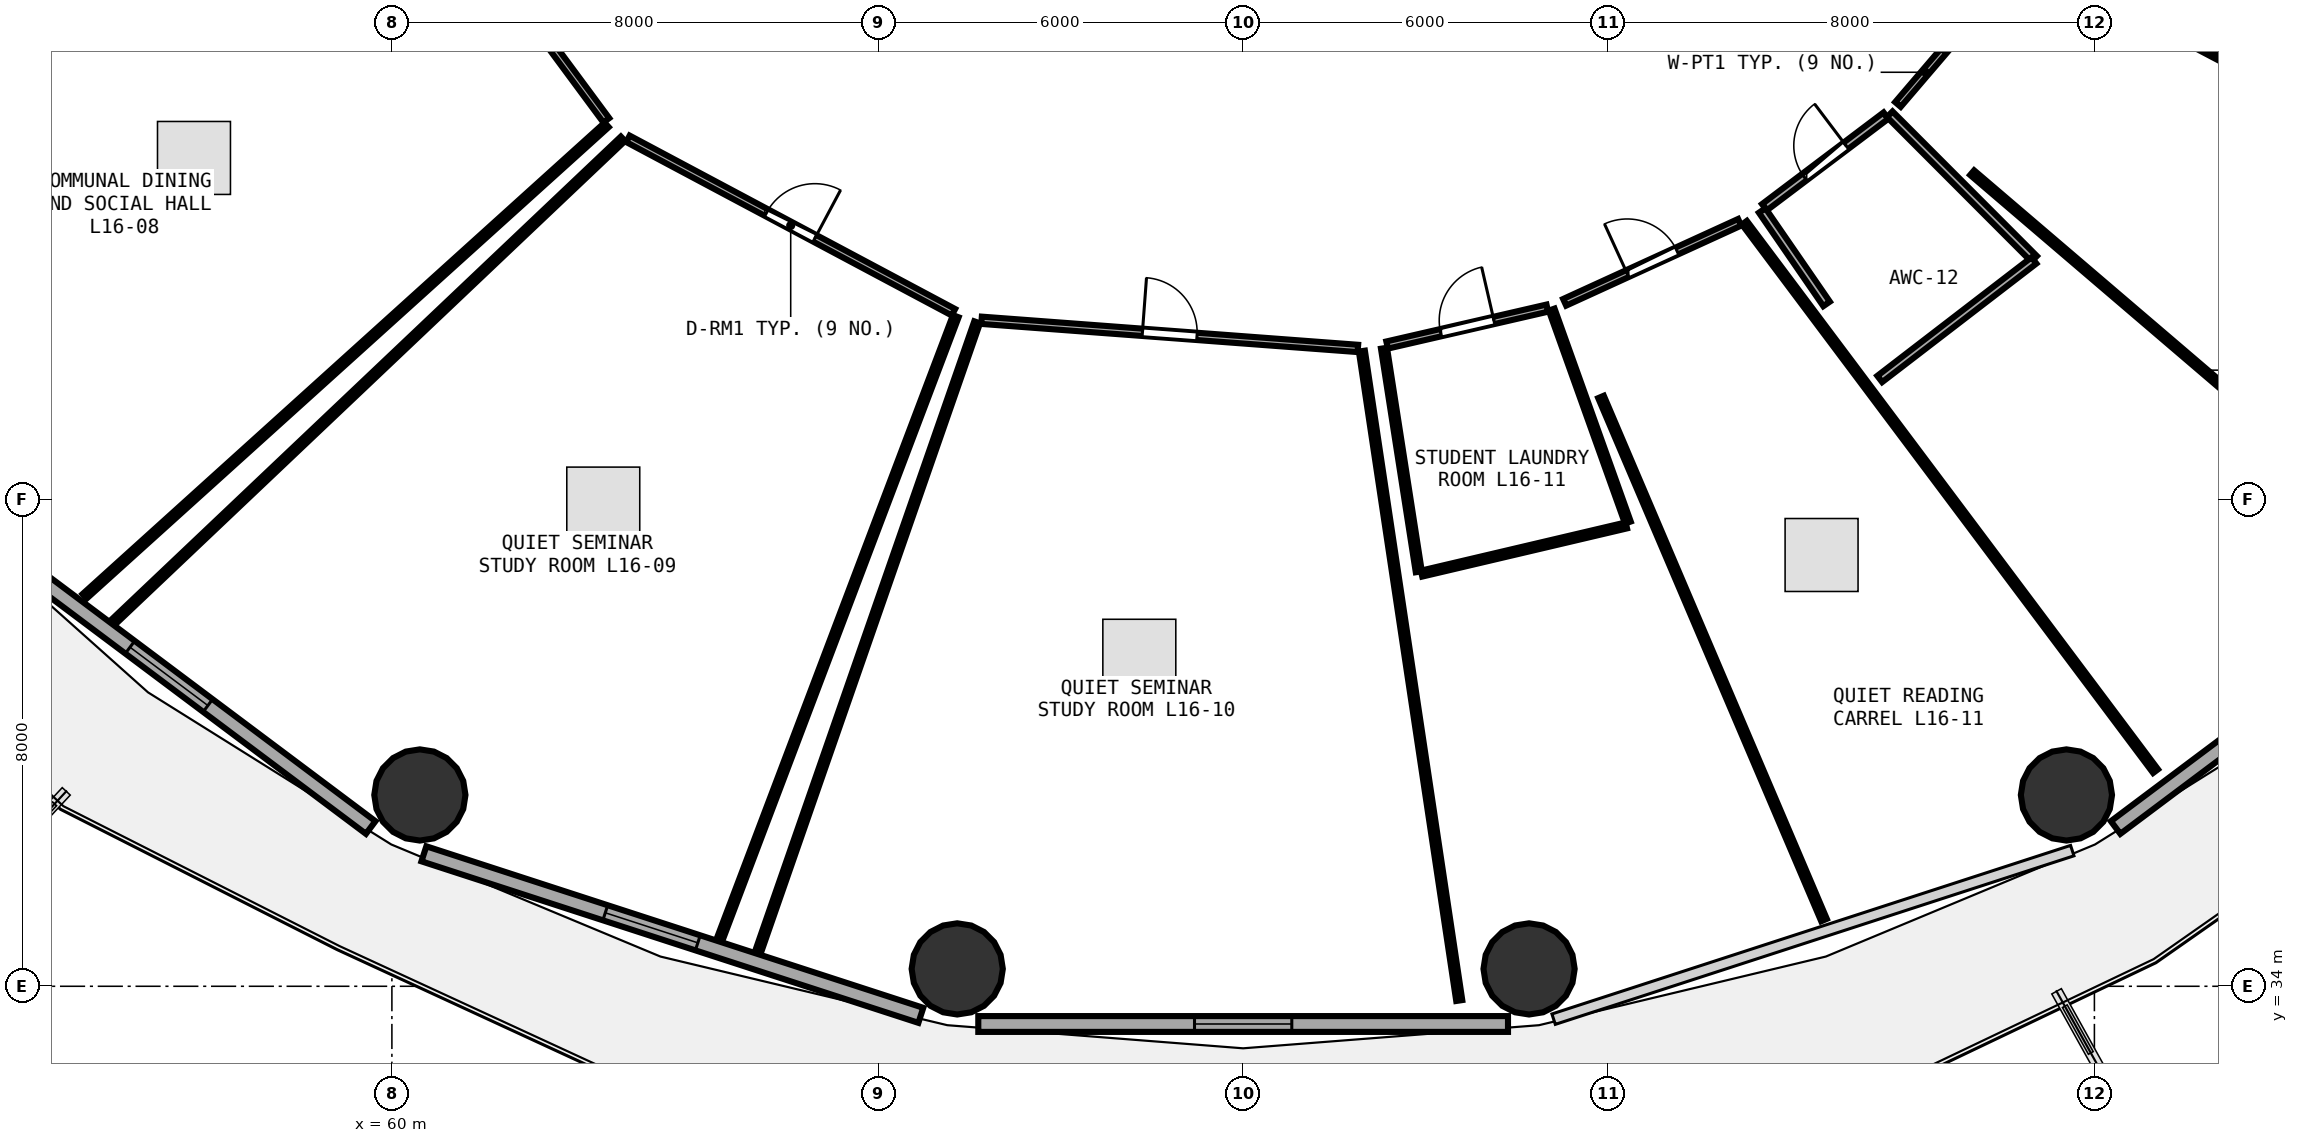
"""IFC4 building model, lengths in metres.
Left out: names, types, materials, properties, quantities, classifications, styles, units other than length and angle.
Written with IfcOpenShell. Run it as: python <this file> out.ifc"""

import sys

from ifc_helpers import new_model, si_unit, direction, frame, frame_2d, origin, origin_2d, place, context, subcontext, project, spatial, rectangle, circle, extrude, element, fill, save


model = new_model("IFC4")
c1 = context("Model", 3, precision=1e-05, world=origin(), true_north=direction((0.0, 1.0)))
c2 = subcontext(c1, "Body", "Model", "MODEL_VIEW")
j1 = project(units=[si_unit("LENGTHUNIT", "METRE"), si_unit("PLANEANGLEUNIT", "RADIAN")], contexts=[c1])
p1 = place(None, origin())
s1 = spatial("IfcSite", under=j1, at=p1, CompositionType="ELEMENT")
p2 = place(p1, origin())
s2 = spatial("IfcBuilding", under=s1, at=p2, CompositionType="ELEMENT")
p3 = place(p2, frame((0.0, 0.0, 63.75)))
s3 = spatial("IfcBuildingStorey", under=s2, at=p3, CompositionType="ELEMENT", Elevation=63.75)
for number, where, z_axis, x_axis in (
    (1, (60.46, 37.146, 0.0), (0.0, 0.0, 1.0), (1.0, 0.0, 0.0)),
    (2, (69.298, 34.286, 0.0), (0.0, 0.0, 1.0), (1.0, 0.0, 0.0)),
    (3, (78.702, 34.286, 0.0), (0.0, 0.0, 1.0), (1.0, 0.0, 0.0)),
    (4, (87.54, 37.146, 0.0), (0.0, 0.0, 1.0), (1.0, 0.0, 0.0)),
):
    element("IfcColumn", number, at=place(p3, frame(where, z_axis=z_axis, x_axis=x_axis)), inside=s3, PredefinedType="COLUMN", context=c2, shape_type="SweptSolid", body=[
        extrude(circle(Radius=0.75, at=origin_2d()), origin(), (0.0, 0.0, 1.0), 3.75),
    ])
p4 = place(p3, frame((53.016, 41.582, 0.0), z_axis=(0.0, 0.0, 1.0), x_axis=(0.80030733173, -0.599590005569, 0.0)))
e5 = element("IfcWall", 5, at=p4, inside=s3, PredefinedType="SOLIDWALL", context=c2, shape_type="SweptSolid", body=[
    extrude(rectangle(XDim=8.291, YDim=0.26, at=frame_2d((4.145, 0.0))), origin(), (0.0, 0.0, 1.0), 3.475),
])
p5 = place(p4, frame((3.345, 0.0, 0.85)))
e6 = element("IfcOpeningElement", 6, at=p5, cuts=e5, PredefinedType="OPENING", context=c2, shape_type="SweptSolid", body=[
    extrude(rectangle(XDim=1.6, YDim=1.45, at=frame_2d((0.8, 0.725))), frame((0.0, 0.14, 0.0), z_axis=(0.0, -1.0, 0.0), x_axis=(1.0, 0.0, 0.0)), (0.0, 0.0, 1.0), 0.28),
])
p6 = place(p3, frame((60.526, 36.178, 0.0), z_axis=(0.0, 0.0, 1.0), x_axis=(0.951039914291, -0.309068085421, 0.0)))
e7 = element("IfcWall", 7, at=p6, inside=s3, PredefinedType="SOLIDWALL", context=c2, shape_type="SweptSolid", body=[
    extrude(rectangle(XDim=8.594, YDim=0.26, at=frame_2d((4.297, 0.0))), origin(), (0.0, 0.0, 1.0), 3.475),
])
p7 = place(p6, frame((3.137, 0.0, 0.85)))
e8 = element("IfcOpeningElement", 8, at=p7, cuts=e7, PredefinedType="OPENING", context=c2, shape_type="SweptSolid", body=[
    extrude(rectangle(XDim=1.6, YDim=1.45, at=frame_2d((0.8, 0.725))), frame((0.0, 0.14, 0.0), z_axis=(0.0, -1.0, 0.0), x_axis=(1.0, 0.0, 0.0)), (0.0, 0.0, 1.0), 0.28),
])
p8 = place(p3, frame((69.644, 33.38, 0.0), z_axis=(0.0, 0.0, 1.0), x_axis=(1.0, 0.0, 0.0)))
e9 = element("IfcWall", 9, at=p8, inside=s3, PredefinedType="SOLIDWALL", context=c2, shape_type="SweptSolid", body=[
    extrude(rectangle(XDim=8.712, YDim=0.26, at=frame_2d((4.356, 0.0))), origin(), (0.0, 0.0, 1.0), 3.475),
])
p9 = place(p8, frame((3.556, 0.0, 0.85)))
e10 = element("IfcOpeningElement", 10, at=p9, cuts=e9, PredefinedType="OPENING", context=c2, shape_type="SweptSolid", body=[
    extrude(rectangle(XDim=1.6, YDim=1.45, at=frame_2d((0.8, 0.725))), frame((0.0, 0.14, 0.0), z_axis=(0.0, -1.0, 0.0), x_axis=(1.0, 0.0, 0.0)), (0.0, 0.0, 1.0), 0.28),
])
p10 = place(p3, frame((88.349, 36.611, 0.0), z_axis=(0.0, 0.0, 1.0), x_axis=(0.80030733173, 0.599590005569, 0.0)))
e11 = element("IfcWall", 11, at=p10, inside=s3, PredefinedType="SOLIDWALL", context=c2, shape_type="SweptSolid", body=[
    extrude(rectangle(XDim=8.291, YDim=0.26, at=frame_2d((4.145, 0.0))), origin(), (0.0, 0.0, 1.0), 3.475),
])
p11 = place(p10, frame((3.345, 0.0, 0.85)))
e12 = element("IfcOpeningElement", 12, at=p11, cuts=e11, PredefinedType="OPENING", context=c2, shape_type="SweptSolid", body=[
    extrude(rectangle(XDim=1.6, YDim=1.45, at=frame_2d((0.8, 0.725))), frame((0.0, 0.14, 0.0), z_axis=(0.0, -1.0, 0.0), x_axis=(1.0, 0.0, 0.0)), (0.0, 0.0, 1.0), 0.28),
])
p12 = place(p3, frame((60.071, 52.912, 0.0), z_axis=(0.0, 0.0, 1.0), x_axis=(0.594763174801, -0.80390096772, 0.0)))
e13 = element("IfcWall", 13, at=p12, inside=s3, PredefinedType="PARTITIONING", context=c2, shape_type="SweptSolid", body=[
    extrude(rectangle(XDim=5.81, YDim=0.12, at=frame_2d((2.905, 0.0))), origin(), (0.0, 0.0, 1.0), 2.875),
])
p13 = place(p12, frame((2.455, 0.0, 0.0)))
e14 = element("IfcOpeningElement", 14, at=p13, cuts=e13, PredefinedType="OPENING", context=c2, shape_type="SweptSolid", body=[
    extrude(rectangle(XDim=0.9, YDim=2.08, at=frame_2d((0.45, 1.04))), frame((0.0, 0.07, 0.0), z_axis=(0.0, -1.0, 0.0), x_axis=(1.0, 0.0, 0.0)), (0.0, 0.0, 1.0), 0.14),
])
p14 = place(p3, frame((63.882, 47.937, 0.0), z_axis=(0.0, 0.0, 1.0), x_axis=(0.882584601599, -0.470153614279, 0.0)))
e15 = element("IfcWall", 15, at=p14, inside=s3, PredefinedType="PARTITIONING", context=c2, shape_type="SweptSolid", body=[
    extrude(rectangle(XDim=6.065, YDim=0.12, at=frame_2d((3.033, 0.0))), origin(), (0.0, 0.0, 1.0), 2.875),
])
p15 = place(p14, frame((2.583, 0.0, 0.0)))
e16 = element("IfcOpeningElement", 16, at=p15, cuts=e15, PredefinedType="OPENING", context=c2, shape_type="SweptSolid", body=[
    extrude(rectangle(XDim=0.9, YDim=2.08, at=frame_2d((0.45, 1.04))), frame((0.0, 0.07, 0.0), z_axis=(0.0, -1.0, 0.0), x_axis=(1.0, 0.0, 0.0)), (0.0, 0.0, 1.0), 0.14),
])
p16 = place(p3, frame((69.698, 44.952, 0.0), z_axis=(0.0, 0.0, 1.0), x_axis=(0.997215128993, -0.074578726908, 0.0)))
e17 = element("IfcWall", 17, at=p16, inside=s3, PredefinedType="PARTITIONING", context=c2, shape_type="SweptSolid", body=[
    extrude(rectangle(XDim=6.207, YDim=0.12, at=frame_2d((3.104, 0.0))), origin(), (0.0, 0.0, 1.0), 3.235),
])
p17 = place(p16, frame((2.653, 0.0, 0.0)))
e18 = element("IfcOpeningElement", 18, at=p17, cuts=e17, PredefinedType="OPENING", context=c2, shape_type="SweptSolid", body=[
    extrude(rectangle(XDim=0.9, YDim=2.08, at=frame_2d((0.45, 1.04))), frame((0.0, 0.07, 0.0), z_axis=(0.0, -1.0, 0.0), x_axis=(1.0, 0.0, 0.0)), (0.0, 0.0, 1.0), 0.14),
])
p18 = place(p3, frame((76.368, 44.545, 0.0), z_axis=(0.0, 0.0, 1.0), x_axis=(0.974445966729, 0.224622033484, 0.0)))
e19 = element("IfcWall", 19, at=p18, inside=s3, PredefinedType="PARTITIONING", context=c2, shape_type="SweptSolid", body=[
    extrude(rectangle(XDim=2.703, YDim=0.12, at=frame_2d((1.352, 0.0))), origin(), (0.0, 0.0, 1.0), 3.235),
])
p19 = place(p18, frame((0.902, 0.0, 0.0)))
e20 = element("IfcOpeningElement", 20, at=p19, cuts=e19, PredefinedType="OPENING", context=c2, shape_type="SweptSolid", body=[
    extrude(rectangle(XDim=0.9, YDim=2.08, at=frame_2d((0.45, 1.04))), frame((0.0, 0.07, 0.0), z_axis=(0.0, -1.0, 0.0), x_axis=(1.0, 0.0, 0.0)), (0.0, 0.0, 1.0), 0.14),
])
p20 = place(p3, frame((79.288, 45.248, 0.0), z_axis=(0.0, 0.0, 1.0), x_axis=(0.909426123825, 0.415865513483, 0.0)))
e21 = element("IfcWall", 21, at=p20, inside=s3, PredefinedType="PARTITIONING", context=c2, shape_type="SweptSolid", body=[
    extrude(rectangle(XDim=3.164, YDim=0.12, at=frame_2d((1.582, 0.0))), origin(), (0.0, 0.0, 1.0), 2.875),
])
p21 = place(p20, frame((1.132, 0.0, 0.0)))
e22 = element("IfcOpeningElement", 22, at=p21, cuts=e21, PredefinedType="OPENING", context=c2, shape_type="SweptSolid", body=[
    extrude(rectangle(XDim=0.9, YDim=2.08, at=frame_2d((0.45, 1.04))), frame((0.0, 0.07, 0.0), z_axis=(0.0, -1.0, 0.0), x_axis=(1.0, 0.0, 0.0)), (0.0, 0.0, 1.0), 0.14),
])
p22 = place(p3, frame((82.573, 46.811, 0.0), z_axis=(0.0, 0.0, 1.0), x_axis=(0.7983589592, 0.602181843188, 0.0)))
e23 = element("IfcWall", 23, at=p22, inside=s3, PredefinedType="PLUMBINGWALL", context=c2, shape_type="SweptSolid", body=[
    extrude(rectangle(XDim=2.504, YDim=0.13, at=frame_2d((1.252, 0.0))), origin(), (0.0, 0.0, 1.0), 2.875),
])
p23 = place(p22, frame((0.822, 0.0, 0.0)))
e24 = element("IfcOpeningElement", 24, at=p23, cuts=e23, PredefinedType="OPENING", context=c2, shape_type="SweptSolid", body=[
    extrude(rectangle(XDim=0.86, YDim=2.05, at=frame_2d((0.43, 1.025))), frame((0.0, 0.075, 0.0), z_axis=(0.0, -1.0, 0.0), x_axis=(1.0, 0.0, 0.0)), (0.0, 0.0, 1.0), 0.15),
])
p24 = place(p3, frame((84.769, 48.502, 0.0), z_axis=(0.0, 0.0, 1.0), x_axis=(0.649870238328, 0.760045178483, 0.0)))
e25 = element("IfcWall", 25, at=p24, inside=s3, PredefinedType="PARTITIONING", context=c2, shape_type="SweptSolid", body=[
    extrude(rectangle(XDim=3.167, YDim=0.12, at=frame_2d((1.583, 0.0))), origin(), (0.0, 0.0, 1.0), 2.875),
])
p25 = place(p24, frame((1.133, 0.0, 0.0)))
e26 = element("IfcOpeningElement", 26, at=p25, cuts=e25, PredefinedType="OPENING", context=c2, shape_type="SweptSolid", body=[
    extrude(rectangle(XDim=0.9, YDim=2.08, at=frame_2d((0.45, 1.04))), frame((0.0, 0.07, 0.0), z_axis=(0.0, -1.0, 0.0), x_axis=(1.0, 0.0, 0.0)), (0.0, 0.0, 1.0), 0.14),
])
p26 = place(p3, frame((63.532, 48.166, 0.0), z_axis=(0.0, 0.0, 1.0), x_axis=(-0.742191353367, -0.670188029577, 0.0)))
e27 = element("IfcWall", 27, at=p26, inside=s3, PredefinedType="PARTITIONING", context=c2, shape_type="SweptSolid", body=[
    extrude(rectangle(XDim=11.569, YDim=0.1, at=frame_2d((5.785, 0.0))), origin(), (0.0, 0.0, 1.0), 2.875),
])
p27 = place(p3, frame((49.008, 49.136, 0.0), z_axis=(0.0, 0.0, 1.0), x_axis=(0.944815756918, 0.327602175634, 0.0)))
e28 = element("IfcWall", 28, at=p27, inside=s3, PredefinedType="PARTITIONING", context=c2, shape_type="SweptSolid", body=[
    extrude(rectangle(XDim=11.632, YDim=0.1, at=frame_2d((5.816, 0.0))), origin(), (0.0, 0.0, 1.0), 2.875),
])
p28 = place(p3, frame((69.274, 45.02, 0.0), z_axis=(0.0, 0.0, 1.0), x_axis=(-0.354325845477, -0.935122021571, 0.0)))
e29 = element("IfcWall", 29, at=p28, inside=s3, PredefinedType="PARTITIONING", context=c2, shape_type="SweptSolid", body=[
    extrude(rectangle(XDim=10.938, YDim=0.1, at=frame_2d((5.469, 0.0))), origin(), (0.0, 0.0, 1.0), 2.875),
])
p29 = place(p3, frame((55.433, 40.003, 0.0), z_axis=(0.0, 0.0, 1.0), x_axis=(0.725627678847, 0.688087546531, 0.0)))
e30 = element("IfcWall", 30, at=p29, inside=s3, PredefinedType="PARTITIONING", context=c2, shape_type="SweptSolid", body=[
    extrude(rectangle(XDim=11.531, YDim=0.1, at=frame_2d((5.765, 0.0))), origin(), (0.0, 0.0, 1.0), 2.875),
])
p30 = place(p3, frame((75.953, 44.445, 0.0), z_axis=(0.0, 0.0, 1.0), x_axis=(0.148282966471, -0.988944974129, 0.0)))
e31 = element("IfcWall", 31, at=p30, inside=s3, PredefinedType="PARTITIONING", context=c2, shape_type="SweptSolid", body=[
    extrude(rectangle(XDim=10.799, YDim=0.1, at=frame_2d((5.399, 0.0))), origin(), (0.0, 0.0, 1.0), 2.875),
])
p31 = place(p3, frame((66.038, 34.612, 0.0), z_axis=(0.0, 0.0, 1.0), x_axis=(0.328662915274, 0.944447292401, 0.0)))
e32 = element("IfcWall", 32, at=p31, inside=s3, PredefinedType="PARTITIONING", context=c2, shape_type="SweptSolid", body=[
    extrude(rectangle(XDim=10.914, YDim=0.1, at=frame_2d((5.457, 0.0))), origin(), (0.0, 0.0, 1.0), 2.875),
])
p32 = place(p3, frame((79.074, 45.128, 0.0), z_axis=(0.0, 0.0, 1.0), x_axis=(0.336806149261, -0.941574010803, 0.0)))
e33 = element("IfcWall", 33, at=p32, inside=s3, PredefinedType="PARTITIONING", context=c2, shape_type="SweptSolid", body=[
    extrude(rectangle(XDim=3.72, YDim=0.1, at=frame_2d((1.86, 0.0))), origin(), (0.0, 0.0, 1.0), 2.875),
])
p33 = place(p3, frame((80.302, 41.579, 0.0), z_axis=(0.0, 0.0, 1.0), x_axis=(-0.973403286496, -0.229098323518, 0.0)))
e34 = element("IfcWall", 34, at=p33, inside=s3, PredefinedType="PARTITIONING", context=c2, shape_type="SweptSolid", body=[
    extrude(rectangle(XDim=3.46, YDim=0.1, at=frame_2d((1.73, 0.0))), origin(), (0.0, 0.0, 1.0), 2.875),
])
p34 = place(p3, frame((76.889, 40.816, 0.0), z_axis=(0.0, 0.0, 1.0), x_axis=(-0.153950475789, 0.988078565198, 0.0)))
e35 = element("IfcWall", 35, at=p34, inside=s3, PredefinedType="PARTITIONING", context=c2, shape_type="SweptSolid", body=[
    extrude(rectangle(XDim=3.72, YDim=0.1, at=frame_2d((1.86, 0.0))), origin(), (0.0, 0.0, 1.0), 3.175),
])
p35 = place(p3, frame((82.244, 46.557, 0.0), z_axis=(0.0, 0.0, 1.0), x_axis=(0.599892569248, -0.800080561794, 0.0)))
e36 = element("IfcWall", 36, at=p35, inside=s3, PredefinedType="PARTITIONING", context=c2, shape_type="SweptSolid", body=[
    extrude(rectangle(XDim=11.272, YDim=0.1, at=frame_2d((5.636, 0.0))), origin(), (0.0, 0.0, 1.0), 2.875),
])
p36 = place(p3, frame((83.553, 35.089, 0.0), z_axis=(0.0, 0.0, 1.0), x_axis=(-0.392154212845, 0.919899490895, 0.0)))
e37 = element("IfcWall", 37, at=p36, inside=s3, PredefinedType="PARTITIONING", context=c2, shape_type="SweptSolid", body=[
    extrude(rectangle(XDim=9.352, YDim=0.1, at=frame_2d((4.676, 0.0))), origin(), (0.0, 0.0, 1.0), 2.875),
])
p37 = place(p3, frame((84.634, 48.341, 0.0), z_axis=(0.0, 0.0, 1.0), x_axis=(0.706525219412, -0.707687865047, 0.0)))
e38 = element("IfcWall", 38, at=p37, inside=s3, PredefinedType="PLUMBINGWALL", context=c2, shape_type="SweptSolid", body=[
    extrude(rectangle(XDim=3.36, YDim=0.13, at=frame_2d((1.68, 0.0))), origin(), (0.0, 0.0, 1.0), 3.235),
])
p38 = place(p3, frame((87.006, 45.937, 0.0), z_axis=(0.0, 0.0, 1.0), x_axis=(-0.792836735531, -0.609434090606, 0.0)))
e39 = element("IfcWall", 39, at=p38, inside=s3, PredefinedType="PLUMBINGWALL", context=c2, shape_type="SweptSolid", body=[
    extrude(rectangle(XDim=3.199, YDim=0.13, at=frame_2d((1.599, 0.0))), origin(), (0.0, 0.0, 1.0), 2.875),
])
p39 = place(p3, frame((83.595, 45.221, 0.0), z_axis=(0.0, 0.0, 1.0), x_axis=(-0.567283552716, 0.823522538136, 0.0)))
e40 = element("IfcWall", 40, at=p39, inside=s3, PredefinedType="PLUMBINGWALL", context=c2, shape_type="SweptSolid", body=[
    extrude(rectangle(XDim=1.866, YDim=0.13, at=frame_2d((0.933, 0.0))), origin(), (0.0, 0.0, 1.0), 3.235),
])
p40 = place(p3, frame((86.901, 50.935, 0.0), z_axis=(0.0, 0.0, 1.0), x_axis=(0.884914680824, -0.46575316173, 0.0)))
e41 = element("IfcWall", 41, at=p40, inside=s3, PredefinedType="PARTITIONING", context=c2, shape_type="SweptSolid", body=[
    extrude(rectangle(XDim=11.963, YDim=0.1, at=frame_2d((5.981, 0.0))), origin(), (0.0, 0.0, 1.0), 2.875),
])
p41 = place(p3, frame((93.589, 40.885, 0.0), z_axis=(0.0, 0.0, 1.0), x_axis=(-0.760200523841, 0.649688512713, 0.0)))
e42 = element("IfcWall", 42, at=p41, inside=s3, PredefinedType="PARTITIONING", context=c2, shape_type="SweptSolid", body=[
    extrude(rectangle(XDim=9.997, YDim=0.1, at=frame_2d((4.998, 0.0))), origin(), (0.0, 0.0, 1.0), 2.875),
])
p42 = place(p3, frame((90.891, 49.333, 0.0), z_axis=(0.0, 0.0, 1.0), x_axis=(-0.895500211225, 0.4450610876, 0.0)))
e43 = element("IfcWall", 43, at=p42, inside=s3, PredefinedType="PLUMBINGWALL", context=c2, shape_type="SweptSolid", body=[
    extrude(rectangle(XDim=4.267, YDim=0.13, at=frame_2d((2.134, 0.0))), origin(), (0.0, 0.0, 1.0), 2.875),
])
p43 = place(p5, origin())
e44 = element("IfcWindow", 44, at=p43, inside=s3, PartitioningType="SINGLE_PANEL", PredefinedType="WINDOW", context=c2, shape_type="SweptSolid", body=[
    extrude(rectangle(XDim=1.6, YDim=1.45, at=frame_2d((0.8, 0.725))), frame((0.0, 0.03, 0.0), z_axis=(0.0, -1.0, 0.0), x_axis=(1.0, 0.0, 0.0)), (0.0, 0.0, 1.0), 0.06),
])
fill(e6, e44)
p44 = place(p7, origin())
e45 = element("IfcWindow", 45, at=p44, inside=s3, PartitioningType="SINGLE_PANEL", PredefinedType="WINDOW", context=c2, shape_type="SweptSolid", body=[
    extrude(rectangle(XDim=1.6, YDim=1.45, at=frame_2d((0.8, 0.725))), frame((0.0, 0.03, 0.0), z_axis=(0.0, -1.0, 0.0), x_axis=(1.0, 0.0, 0.0)), (0.0, 0.0, 1.0), 0.06),
])
fill(e8, e45)
p45 = place(p9, origin())
e46 = element("IfcWindow", 46, at=p45, inside=s3, PartitioningType="SINGLE_PANEL", PredefinedType="WINDOW", context=c2, shape_type="SweptSolid", body=[
    extrude(rectangle(XDim=1.6, YDim=1.45, at=frame_2d((0.8, 0.725))), frame((0.0, 0.03, 0.0), z_axis=(0.0, -1.0, 0.0), x_axis=(1.0, 0.0, 0.0)), (0.0, 0.0, 1.0), 0.06),
])
fill(e10, e46)
p46 = place(p15, origin())
e47 = element("IfcDoor", 47, at=p46, inside=s3, OperationType="SINGLE_SWING_RIGHT", PredefinedType="DOOR", context=c2, shape_type="SweptSolid", body=[
    extrude(rectangle(XDim=0.9, YDim=2.08, at=frame_2d((0.45, 1.04))), frame((0.0, 0.025, 0.0), z_axis=(0.0, -1.0, 0.0), x_axis=(1.0, 0.0, 0.0)), (0.0, 0.0, 1.0), 0.05),
])
fill(e16, e47)
p47 = place(p17, origin())
e48 = element("IfcDoor", 48, at=p47, inside=s3, OperationType="SINGLE_SWING_LEFT", PredefinedType="DOOR", context=c2, shape_type="SweptSolid", body=[
    extrude(rectangle(XDim=0.9, YDim=2.08, at=frame_2d((0.45, 1.04))), frame((0.0, 0.025, 0.0), z_axis=(0.0, -1.0, 0.0), x_axis=(1.0, 0.0, 0.0)), (0.0, 0.0, 1.0), 0.05),
])
fill(e18, e48)
p48 = place(p19, origin())
e49 = element("IfcDoor", 49, at=p48, inside=s3, OperationType="SINGLE_SWING_RIGHT", PredefinedType="DOOR", context=c2, shape_type="SweptSolid", body=[
    extrude(rectangle(XDim=0.9, YDim=2.08, at=frame_2d((0.45, 1.04))), frame((0.0, 0.025, 0.0), z_axis=(0.0, -1.0, 0.0), x_axis=(1.0, 0.0, 0.0)), (0.0, 0.0, 1.0), 0.05),
])
fill(e20, e49)
p49 = place(p21, origin())
e50 = element("IfcDoor", 50, at=p49, inside=s3, OperationType="SINGLE_SWING_LEFT", PredefinedType="DOOR", context=c2, shape_type="SweptSolid", body=[
    extrude(rectangle(XDim=0.9, YDim=2.08, at=frame_2d((0.45, 1.04))), frame((0.0, 0.025, 0.0), z_axis=(0.0, -1.0, 0.0), x_axis=(1.0, 0.0, 0.0)), (0.0, 0.0, 1.0), 0.05),
])
fill(e22, e50)
p50 = place(p23, origin())
e51 = element("IfcDoor", 51, at=p50, inside=s3, OperationType="SINGLE_SWING_RIGHT", PredefinedType="DOOR", context=c2, shape_type="SweptSolid", body=[
    extrude(rectangle(XDim=0.86, YDim=2.05, at=frame_2d((0.43, 1.025))), frame((0.0, 0.025, 0.0), z_axis=(0.0, -1.0, 0.0), x_axis=(1.0, 0.0, 0.0)), (0.0, 0.0, 1.0), 0.05),
])
fill(e24, e51)
p51 = place(p25, origin())
e52 = element("IfcDoor", 52, at=p51, inside=s3, OperationType="SINGLE_SWING_LEFT", PredefinedType="DOOR", context=c2, shape_type="SweptSolid", body=[
    extrude(rectangle(XDim=0.9, YDim=2.08, at=frame_2d((0.45, 1.04))), frame((0.0, 0.025, 0.0), z_axis=(0.0, -1.0, 0.0), x_axis=(1.0, 0.0, 0.0)), (0.0, 0.0, 1.0), 0.05),
])
fill(e26, e52)
save(model, sys.argv[1])
